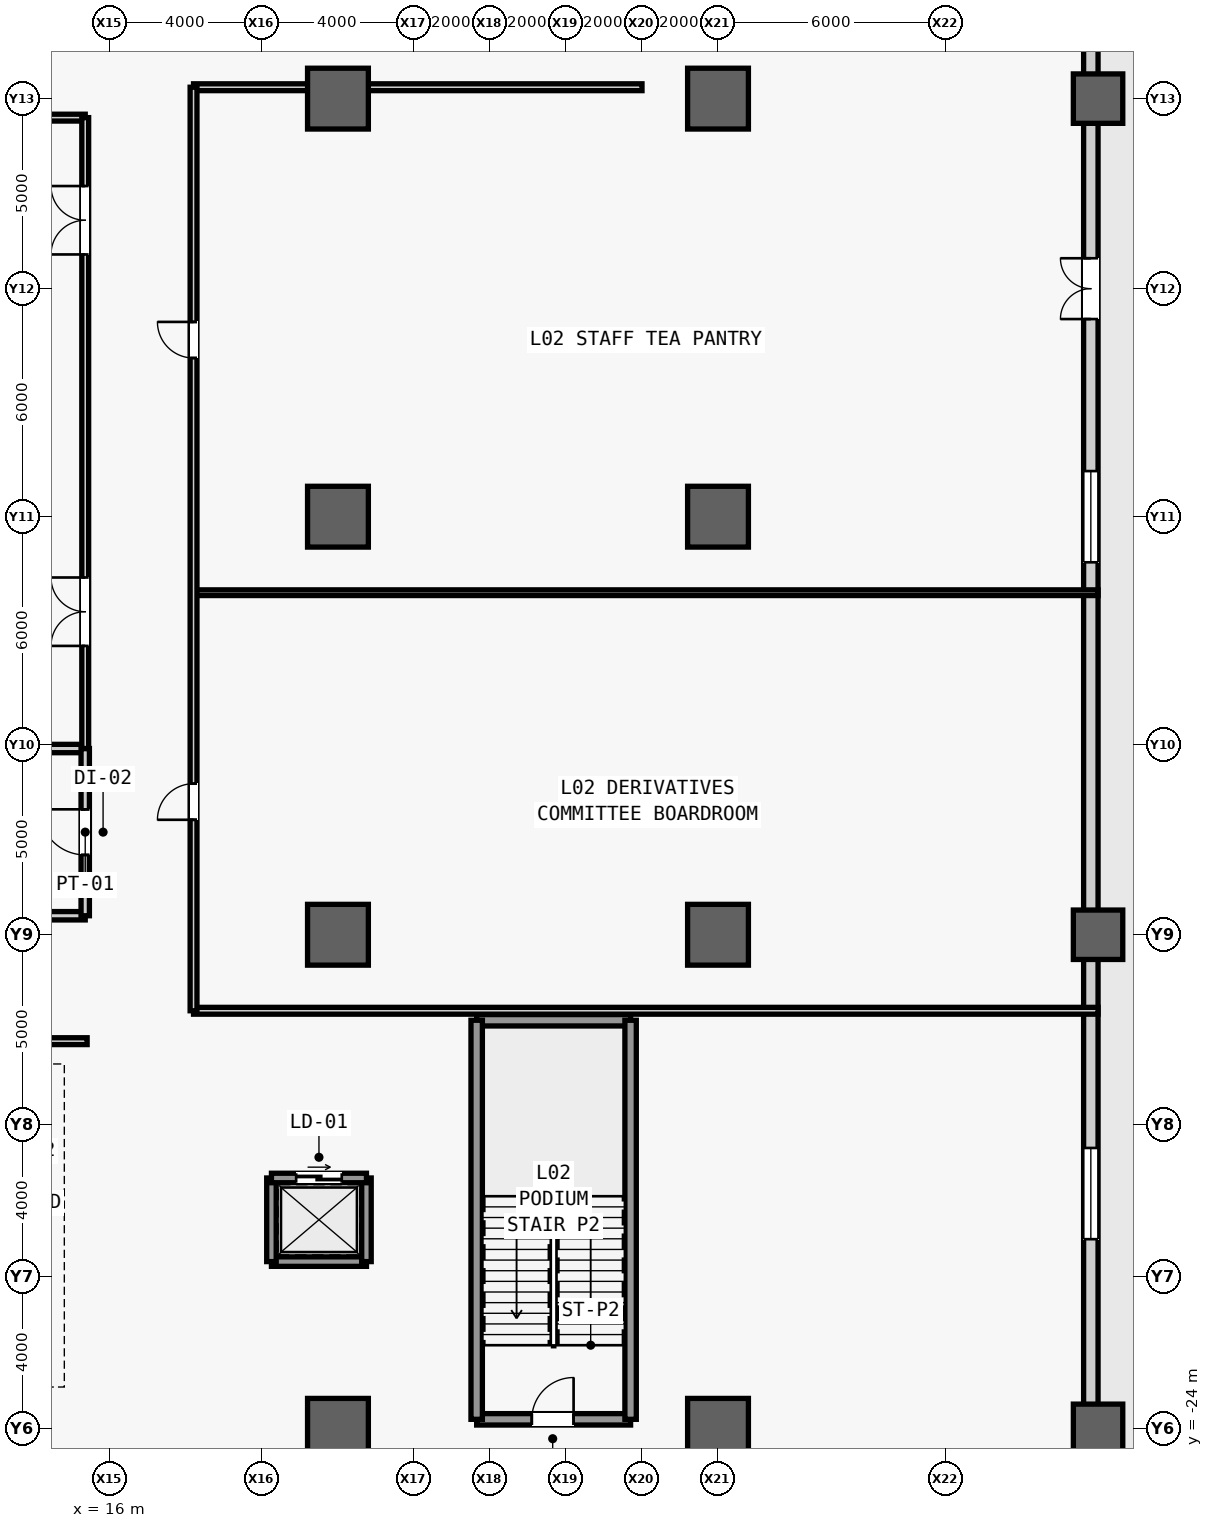
"""IFC4 building model, lengths in metres.
Left out: names, types, materials, properties, quantities, classifications, styles, units other than length and angle.
Written with IfcOpenShell. Run it as: python <this file> out.ifc"""

import sys

from ifc_helpers import new_model, si_unit, direction, frame, frame_2d, origin, origin_2d, place, context, subcontext, project, spatial, rectangle, extrude, source, transform, mapped, element, fill, save


model = new_model("IFC4")
c1 = context("Model", 3, precision=1e-05, world=origin(), true_north=direction((0.0, 1.0)))
c2 = subcontext(c1, "Body", "Model", "MODEL_VIEW")
j1 = project(units=[si_unit("LENGTHUNIT", "METRE"), si_unit("PLANEANGLEUNIT", "RADIAN")], contexts=[c1])
p1 = place(None, origin())
s1 = spatial("IfcSite", under=j1, at=p1, CompositionType="ELEMENT")
p2 = place(p1, origin())
s2 = spatial("IfcBuilding", under=s1, at=p2, CompositionType="ELEMENT")
p3 = place(p2, frame((0.0, 0.0, 12.0)))
s3 = spatial("IfcBuildingStorey", under=s2, at=p3, CompositionType="ELEMENT", Elevation=12.0)
m1 = source(origin(), c2, "Body", "SweptSolid", [
    extrude(rectangle(XDim=1.6, YDim=1.6, at=origin_2d()), origin(), (0.0, 0.0, 1.0), 5.4),
])
for number, where, z_axis, x_axis in (
    (1, (22.0, -24.0, 0.0), (0.0, 0.0, 1.0), (1.0, 0.0, 0.0)),
    (2, (22.0, -11.0, 0.0), (0.0, 0.0, 1.0), (1.0, 0.0, 0.0)),
    (3, (22.0, 0.0, 0.0), (0.0, 0.0, 1.0), (1.0, 0.0, 0.0)),
    (4, (22.0, 11.0, 0.0), (0.0, 0.0, 1.0), (1.0, 0.0, 0.0)),
    (5, (32.0, -24.0, 0.0), (0.0, 0.0, 1.0), (1.0, 0.0, 0.0)),
    (6, (32.0, -11.0, 0.0), (0.0, 0.0, 1.0), (1.0, 0.0, 0.0)),
    (7, (32.0, 0.0, 0.0), (0.0, 0.0, 1.0), (1.0, 0.0, 0.0)),
    (8, (32.0, 11.0, 0.0), (0.0, 0.0, 1.0), (1.0, 0.0, 0.0)),
):
    element("IfcColumn", number, at=place(p3, frame(where, z_axis=z_axis, x_axis=x_axis)), inside=s3, PredefinedType="COLUMN", context=c2, shape_type="MappedRepresentation", body=[
        mapped(m1, transform((0.0, 0.0, 0.0), scale=1.0)),
    ])
m2 = source(origin(), c2, "Body", "SweptSolid", [
    extrude(rectangle(XDim=1.3, YDim=1.3, at=origin_2d()), origin(), (0.0, 0.0, 1.0), 5.4),
])
for number, where, z_axis, x_axis in (
    (9, (42.0, -24.0, 0.0), (0.0, 0.0, 1.0), (1.0, 0.0, 0.0)),
    (10, (42.0, -11.0, 0.0), (0.0, 0.0, 1.0), (1.0, 0.0, 0.0)),
    (11, (42.0, 11.0, 0.0), (0.0, 0.0, 1.0), (1.0, 0.0, 0.0)),
):
    element("IfcColumn", number, at=place(p3, frame(where, z_axis=z_axis, x_axis=x_axis)), inside=s3, PredefinedType="COLUMN", context=c2, shape_type="MappedRepresentation", body=[
        mapped(m2, transform((0.0, 0.0, 0.0), scale=1.0)),
    ])
m3 = source(origin(), c2, "Body", "SweptSolid", [
    extrude(rectangle(XDim=71.24, YDim=0.38, at=frame_2d((35.62, 0.0))), origin(), (0.0, 0.0, 1.0), 3.28),
])
p4 = place(p3, frame((41.81, -35.62, 0.0), z_axis=(0.0, 0.0, 1.0), x_axis=(0.0, 1.0, 0.0)))
e12 = element("IfcWall", 12, at=p4, inside=s3, PredefinedType="STANDARD", context=c2, shape_type="MappedRepresentation", body=[
    mapped(m3, transform((0.0, 0.0, 0.0), scale=1.0)),
])
m4 = source(origin(), c2, "Body", "SweptSolid", [
    extrude(rectangle(XDim=1.6, YDim=2.25, at=frame_2d((0.8, 1.125))), frame((0.0, 0.2, 0.0), z_axis=(0.0, -1.0, 0.0), x_axis=(1.0, 0.0, 0.0)), (0.0, 0.0, 1.0), 0.4),
])
p5 = place(p4, frame((40.82, 0.0, 0.0)))
e13 = element("IfcOpeningElement", 13, at=p5, cuts=e12, PredefinedType="OPENING", context=c2, shape_type="MappedRepresentation", body=[
    mapped(m4, transform((0.0, 0.0, 0.0), scale=1.0)),
])
m5 = source(origin(), c2, "Body", "SweptSolid", [
    extrude(rectangle(XDim=2.4, YDim=2.56, at=frame_2d((1.2, 1.28))), frame((0.0, 0.2, 0.0), z_axis=(0.0, -1.0, 0.0), x_axis=(1.0, 0.0, 0.0)), (0.0, 0.0, 1.0), 0.4),
])
p6 = place(p4, frame((16.61, 0.0, 0.5)))
e14 = element("IfcOpeningElement", 14, at=p6, cuts=e12, PredefinedType="OPENING", context=c2, shape_type="MappedRepresentation", body=[
    mapped(m5, transform((0.0, 0.0, 0.0), scale=1.0)),
])
p7 = place(p4, frame((34.42, 0.0, 0.5)))
e15 = element("IfcOpeningElement", 15, at=p7, cuts=e12, PredefinedType="OPENING", context=c2, shape_type="MappedRepresentation", body=[
    mapped(m5, transform((0.0, 0.0, 0.0), scale=1.0)),
])
p8 = place(p4, frame((52.23, 0.0, 0.5)))
e16 = element("IfcOpeningElement", 16, at=p8, cuts=e12, PredefinedType="OPENING", context=c2, shape_type="MappedRepresentation", body=[
    mapped(m5, transform((0.0, 0.0, 0.0), scale=1.0)),
])
m6 = source(origin(), c2, "Body", "SweptSolid", [
    extrude(rectangle(XDim=4.05, YDim=0.22, at=frame_2d((2.025, 0.0))), origin(), (0.0, 0.0, 1.0), 5.08),
])
for number, where, z_axis, x_axis in (
    (17, (11.3, -10.5, 0.0), (0.0, 0.0, 1.0), (1.0, 0.0, 0.0)),
    (18, (11.3, -6.1, 0.0), (0.0, 0.0, 1.0), (1.0, 0.0, 0.0)),
):
    element("IfcWall", number, at=place(p3, frame(where, z_axis=z_axis, x_axis=x_axis)), inside=s3, PredefinedType="PARTITIONING", context=c2, shape_type="MappedRepresentation", body=[
        mapped(m6, transform((0.0, 0.0, 0.0), scale=1.0)),
    ])
m7 = source(origin(), c2, "Body", "SweptSolid", [
    extrude(rectangle(XDim=4.4, YDim=0.22, at=frame_2d((2.2, 0.0))), origin(), (0.0, 0.0, 1.0), 5.08),
])
p9 = place(p3, frame((15.35, -10.5, 0.0), z_axis=(0.0, 0.0, 1.0), x_axis=(0.0, 1.0, 0.0)))
e19 = element("IfcWall", 19, at=p9, inside=s3, PredefinedType="PARTITIONING", context=c2, shape_type="MappedRepresentation", body=[
    mapped(m7, transform((0.0, 0.0, 0.0), scale=1.0)),
])
m8 = source(origin(), c2, "Body", "SweptSolid", [
    extrude(rectangle(XDim=1.2, YDim=2.2, at=frame_2d((0.6, 1.1))), frame((0.0, 0.12, 0.0), z_axis=(0.0, -1.0, 0.0), x_axis=(1.0, 0.0, 0.0)), (0.0, 0.0, 1.0), 0.24),
])
p10 = place(p9, frame((1.6, 0.0, 0.0)))
e20 = element("IfcOpeningElement", 20, at=p10, cuts=e19, PredefinedType="OPENING", context=c2, shape_type="MappedRepresentation", body=[
    mapped(m8, transform((0.0, 0.0, 0.0), scale=1.0)),
])
m9 = source(origin(), c2, "Body", "SweptSolid", [
    extrude(rectangle(XDim=4.05, YDim=0.18, at=frame_2d((2.025, 0.0))), origin(), (0.0, 0.0, 1.0), 5.08),
])
p11 = place(p3, frame((11.3, 10.5, 0.0), z_axis=(0.0, 0.0, 1.0), x_axis=(1.0, 0.0, 0.0)))
e21 = element("IfcWall", 21, at=p11, inside=s3, PredefinedType="PARTITIONING", context=c2, shape_type="MappedRepresentation", body=[
    mapped(m9, transform((0.0, 0.0, 0.0), scale=1.0)),
])
m10 = source(origin(), c2, "Body", "SweptSolid", [
    extrude(rectangle(XDim=16.6, YDim=0.18, at=frame_2d((8.3, 0.0))), origin(), (0.0, 0.0, 1.0), 5.08),
])
p12 = place(p3, frame((15.35, -6.1, 0.0), z_axis=(0.0, 0.0, 1.0), x_axis=(0.0, 1.0, 0.0)))
e22 = element("IfcWall", 22, at=p12, inside=s3, PredefinedType="PARTITIONING", context=c2, shape_type="MappedRepresentation", body=[
    mapped(m10, transform((0.0, 0.0, 0.0), scale=1.0)),
])
m11 = source(origin(), c2, "Body", "SweptSolid", [
    extrude(rectangle(XDim=1.8, YDim=2.25, at=frame_2d((0.9, 1.125))), frame((0.0, 0.1, 0.0), z_axis=(0.0, -1.0, 0.0), x_axis=(1.0, 0.0, 0.0)), (0.0, 0.0, 1.0), 0.2),
])
p13 = place(p12, frame((2.7, 0.0, 0.0)))
e23 = element("IfcOpeningElement", 23, at=p13, cuts=e22, PredefinedType="OPENING", context=c2, shape_type="MappedRepresentation", body=[
    mapped(m11, transform((0.0, 0.0, 0.0), scale=1.0)),
])
p14 = place(p12, frame((13.0, 0.0, 0.0)))
e24 = element("IfcOpeningElement", 24, at=p14, cuts=e22, PredefinedType="OPENING", context=c2, shape_type="MappedRepresentation", body=[
    mapped(m11, transform((0.0, 0.0, 0.0), scale=1.0)),
])
m12 = source(origin(), c2, "Body", "SweptSolid", [
    extrude(rectangle(XDim=4.05, YDim=0.3, at=frame_2d((2.025, 0.0))), origin(), (0.0, 0.0, 1.0), 5.08),
])
p15 = place(p3, frame((25.65, -23.75, 0.0), z_axis=(0.0, 0.0, 1.0), x_axis=(1.0, 0.0, 0.0)))
e25 = element("IfcWall", 25, at=p15, inside=s3, PredefinedType="SHEAR", context=c2, shape_type="MappedRepresentation", body=[
    mapped(m12, transform((0.0, 0.0, 0.0), scale=1.0)),
])
m13 = source(origin(), c2, "Body", "SweptSolid", [
    extrude(rectangle(XDim=1.1, YDim=2.2, at=frame_2d((0.55, 1.1))), frame((0.0, 0.16, 0.0), z_axis=(0.0, -1.0, 0.0), x_axis=(1.0, 0.0, 0.0)), (0.0, 0.0, 1.0), 0.32),
])
p16 = place(p15, frame((1.45, 0.0, 0.0)))
e26 = element("IfcOpeningElement", 26, at=p16, cuts=e25, PredefinedType="OPENING", context=c2, shape_type="MappedRepresentation", body=[
    mapped(m13, transform((0.0, 0.0, 0.0), scale=1.0)),
])
p17 = place(p3, frame((25.65, -13.25, 0.0), z_axis=(0.0, 0.0, 1.0), x_axis=(1.0, 0.0, 0.0)))
e27 = element("IfcWall", 27, at=p17, inside=s3, PredefinedType="SHEAR", context=c2, shape_type="MappedRepresentation", body=[
    mapped(m12, transform((0.0, 0.0, 0.0), scale=1.0)),
])
m14 = source(origin(), c2, "Body", "SweptSolid", [
    extrude(rectangle(XDim=10.5, YDim=0.3, at=frame_2d((5.25, 0.0))), origin(), (0.0, 0.0, 1.0), 5.08),
])
for number, where, z_axis, x_axis in (
    (28, (25.65, -23.75, 0.0), (0.0, 0.0, 1.0), (0.0, 1.0, 0.0)),
    (29, (29.7, -23.75, 0.0), (0.0, 0.0, 1.0), (0.0, 1.0, 0.0)),
):
    element("IfcWall", number, at=place(p3, frame(where, z_axis=z_axis, x_axis=x_axis)), inside=s3, PredefinedType="SHEAR", context=c2, shape_type="MappedRepresentation", body=[
        mapped(m14, transform((0.0, 0.0, 0.0), scale=1.0)),
    ])
m15 = source(origin(), c2, "Body", "SweptSolid", [
    extrude(rectangle(XDim=2.5, YDim=0.25, at=frame_2d((1.25, 0.0))), origin(), (0.0, 0.0, 1.0), 5.08),
])
p18 = place(p3, frame((20.25, -19.6, 0.0), z_axis=(0.0, 0.0, 1.0), x_axis=(1.0, 0.0, 0.0)))
e30 = element("IfcWall", 30, at=p18, inside=s3, PredefinedType="SHEAR", context=c2, shape_type="MappedRepresentation", body=[
    mapped(m15, transform((0.0, 0.0, 0.0), scale=1.0)),
])
m16 = source(origin(), c2, "Body", "SweptSolid", [
    extrude(rectangle(XDim=2.2, YDim=0.25, at=frame_2d((1.1, 0.0))), origin(), (0.0, 0.0, 1.0), 5.08),
])
for number, where, z_axis, x_axis in (
    (31, (20.25, -19.6, 0.0), (0.0, 0.0, 1.0), (0.0, 1.0, 0.0)),
    (32, (22.75, -19.6, 0.0), (0.0, 0.0, 1.0), (0.0, 1.0, 0.0)),
):
    element("IfcWall", number, at=place(p3, frame(where, z_axis=z_axis, x_axis=x_axis)), inside=s3, PredefinedType="SHEAR", context=c2, shape_type="MappedRepresentation", body=[
        mapped(m16, transform((0.0, 0.0, 0.0), scale=1.0)),
    ])
p19 = place(p3, frame((20.25, -17.4, 0.0), z_axis=(0.0, 0.0, 1.0), x_axis=(1.0, 0.0, 0.0)))
e33 = element("IfcWall", 33, at=p19, inside=s3, PredefinedType="SHEAR", context=c2, shape_type="MappedRepresentation", body=[
    mapped(m15, transform((0.0, 0.0, 0.0), scale=1.0)),
])
m17 = source(origin(), c2, "Body", "SweptSolid", [
    extrude(rectangle(XDim=1.2, YDim=2.3, at=frame_2d((0.6, 1.15))), frame((0.0, 0.135, 0.0), z_axis=(0.0, -1.0, 0.0), x_axis=(1.0, 0.0, 0.0)), (0.0, 0.0, 1.0), 0.27),
])
p20 = place(p19, frame((0.65, 0.0, 0.0)))
e34 = element("IfcOpeningElement", 34, at=p20, cuts=e33, PredefinedType="OPENING", context=c2, shape_type="MappedRepresentation", body=[
    mapped(m17, transform((0.0, 0.0, 0.0), scale=1.0)),
])
m18 = source(origin(), c2, "Body", "SweptSolid", [
    extrude(rectangle(XDim=30.8, YDim=0.18, at=frame_2d((15.4, 0.0))), origin(), (0.0, 0.0, 1.0), 5.08),
])
p21 = place(p3, frame((-15.4, -13.8, 0.0), z_axis=(0.0, 0.0, 1.0), x_axis=(1.0, 0.0, 0.0)))
e35 = element("IfcWall", 35, at=p21, inside=s3, PredefinedType="PARTITIONING", context=c2, shape_type="MappedRepresentation", body=[
    mapped(m18, transform((0.0, 0.0, 0.0), scale=1.0)),
])
p22 = place(p21, frame((2.7, 0.0, 0.0)))
e36 = element("IfcOpeningElement", 36, at=p22, cuts=e35, PredefinedType="OPENING", context=c2, shape_type="MappedRepresentation", body=[
    mapped(m11, transform((0.0, 0.0, 0.0), scale=1.0)),
])
p23 = place(p21, frame((26.3, 0.0, 0.0)))
e37 = element("IfcOpeningElement", 37, at=p23, cuts=e35, PredefinedType="OPENING", context=c2, shape_type="MappedRepresentation", body=[
    mapped(m11, transform((0.0, 0.0, 0.0), scale=1.0)),
])
m19 = source(origin(), c2, "Body", "SweptSolid", [
    extrude(rectangle(XDim=11.8, YDim=0.18, at=frame_2d((5.9, 0.0))), origin(), (0.0, 0.0, 1.0), 3.28),
])
p24 = place(p3, frame((18.2, 11.3, 0.0), z_axis=(0.0, 0.0, 1.0), x_axis=(1.0, 0.0, 0.0)))
e38 = element("IfcWall", 38, at=p24, inside=s3, PredefinedType="PARTITIONING", context=c2, shape_type="MappedRepresentation", body=[
    mapped(m19, transform((0.0, 0.0, 0.0), scale=1.0)),
])
m20 = source(origin(), c2, "Body", "SweptSolid", [
    extrude(rectangle(XDim=23.8, YDim=0.18, at=frame_2d((11.9, 0.0))), origin(), (0.0, 0.0, 1.0), 5.08),
])
p25 = place(p3, frame((18.2, -13.0, 0.0), z_axis=(0.0, 0.0, 1.0), x_axis=(1.0, 0.0, 0.0)))
e39 = element("IfcWall", 39, at=p25, inside=s3, PredefinedType="PARTITIONING", context=c2, shape_type="MappedRepresentation", body=[
    mapped(m20, transform((0.0, 0.0, 0.0), scale=1.0)),
])
m21 = source(origin(), c2, "Body", "SweptSolid", [
    extrude(rectangle(XDim=23.8, YDim=0.15, at=frame_2d((11.9, 0.0))), origin(), (0.0, 0.0, 1.0), 5.08),
])
p26 = place(p3, frame((18.2, -2.0, 0.0), z_axis=(0.0, 0.0, 1.0), x_axis=(1.0, 0.0, 0.0)))
e40 = element("IfcWall", 40, at=p26, inside=s3, PredefinedType="PARTITIONING", context=c2, shape_type="MappedRepresentation", body=[
    mapped(m21, transform((0.0, 0.0, 0.0), scale=1.0)),
])
m22 = source(origin(), c2, "Body", "SweptSolid", [
    extrude(rectangle(XDim=24.3, YDim=0.18, at=frame_2d((12.15, 0.0))), origin(), (0.0, 0.0, 1.0), 5.08),
])
p27 = place(p3, frame((18.2, -13.0, 0.0), z_axis=(0.0, 0.0, 1.0), x_axis=(0.0, 1.0, 0.0)))
e41 = element("IfcWall", 41, at=p27, inside=s3, PredefinedType="PARTITIONING", context=c2, shape_type="MappedRepresentation", body=[
    mapped(m22, transform((0.0, 0.0, 0.0), scale=1.0)),
])
m23 = source(origin(), c2, "Body", "SweptSolid", [
    extrude(rectangle(XDim=0.95, YDim=2.15, at=frame_2d((0.475, 1.075))), frame((0.0, 0.1, 0.0), z_axis=(0.0, -1.0, 0.0), x_axis=(1.0, 0.0, 0.0)), (0.0, 0.0, 1.0), 0.2),
])
p28 = place(p27, frame((5.025, 0.0, 0.0)))
e42 = element("IfcOpeningElement", 42, at=p28, cuts=e41, PredefinedType="OPENING", context=c2, shape_type="MappedRepresentation", body=[
    mapped(m23, transform((0.0, 0.0, 0.0), scale=1.0)),
])
p29 = place(p27, frame((17.175, 0.0, 0.0)))
e43 = element("IfcOpeningElement", 43, at=p29, cuts=e41, PredefinedType="OPENING", context=c2, shape_type="MappedRepresentation", body=[
    mapped(m23, transform((0.0, 0.0, 0.0), scale=1.0)),
])
m24 = source(origin(), c2, "Body", "SweptSolid", [
    extrude(rectangle(XDim=1.6, YDim=2.25, at=frame_2d((0.8, 1.125))), frame((0.0, 0.025, 0.0), z_axis=(0.0, -1.0, 0.0), x_axis=(1.0, 0.0, 0.0)), (0.0, 0.0, 1.0), 0.05),
])
p30 = place(p5, origin())
e44 = element("IfcDoor", 44, at=p30, inside=s3, OperationType="DOUBLE_DOOR_SINGLE_SWING", PredefinedType="DOOR", context=c2, shape_type="MappedRepresentation", body=[
    mapped(m24, transform((0.0, 0.0, 0.0), scale=1.0)),
])
fill(e13, e44)
m25 = source(origin(), c2, "Body", "SweptSolid", [
    extrude(rectangle(XDim=2.4, YDim=2.56, at=frame_2d((1.2, 1.28))), frame((0.0, 0.03, 0.0), z_axis=(0.0, -1.0, 0.0), x_axis=(1.0, 0.0, 0.0)), (0.0, 0.0, 1.0), 0.06),
])
p31 = place(p6, origin())
e45 = element("IfcWindow", 45, at=p31, inside=s3, PartitioningType="SINGLE_PANEL", PredefinedType="WINDOW", context=c2, shape_type="MappedRepresentation", body=[
    mapped(m25, transform((0.0, 0.0, 0.0), scale=1.0)),
])
fill(e14, e45)
p32 = place(p7, origin())
e46 = element("IfcWindow", 46, at=p32, inside=s3, PartitioningType="SINGLE_PANEL", PredefinedType="WINDOW", context=c2, shape_type="MappedRepresentation", body=[
    mapped(m25, transform((0.0, 0.0, 0.0), scale=1.0)),
])
fill(e15, e46)
m26 = source(origin(), c2, "Body", "SweptSolid", [
    extrude(rectangle(XDim=1.2, YDim=2.2, at=frame_2d((0.6, 1.1))), frame((0.0, 0.025, 0.0), z_axis=(0.0, -1.0, 0.0), x_axis=(1.0, 0.0, 0.0)), (0.0, 0.0, 1.0), 0.05),
])
p33 = place(p10, origin())
e47 = element("IfcDoor", 47, at=p33, inside=s3, OperationType="SINGLE_SWING_RIGHT", PredefinedType="DOOR", context=c2, shape_type="MappedRepresentation", body=[
    mapped(m26, transform((0.0, 0.0, 0.0), scale=1.0)),
])
fill(e20, e47)
m27 = source(origin(), c2, "Body", "SweptSolid", [
    extrude(rectangle(XDim=1.8, YDim=2.25, at=frame_2d((0.9, 1.125))), frame((0.0, 0.025, 0.0), z_axis=(0.0, -1.0, 0.0), x_axis=(1.0, 0.0, 0.0)), (0.0, 0.0, 1.0), 0.05),
])
p34 = place(p13, origin())
e48 = element("IfcDoor", 48, at=p34, inside=s3, OperationType="SINGLE_SWING_RIGHT", PredefinedType="DOOR", context=c2, shape_type="MappedRepresentation", body=[
    mapped(m27, transform((0.0, 0.0, 0.0), scale=1.0)),
])
fill(e23, e48)
p35 = place(p14, origin())
e49 = element("IfcDoor", 49, at=p35, inside=s3, OperationType="SINGLE_SWING_LEFT", PredefinedType="DOOR", context=c2, shape_type="MappedRepresentation", body=[
    mapped(m27, transform((0.0, 0.0, 0.0), scale=1.0)),
])
fill(e24, e49)
m28 = source(origin(), c2, "Body", "SweptSolid", [
    extrude(rectangle(XDim=1.1, YDim=2.2, at=frame_2d((0.55, 1.1))), frame((0.0, 0.025, 0.0), z_axis=(0.0, -1.0, 0.0), x_axis=(1.0, 0.0, 0.0)), (0.0, 0.0, 1.0), 0.05),
])
p36 = place(p16, origin())
e50 = element("IfcDoor", 50, at=p36, inside=s3, OperationType="SINGLE_SWING_RIGHT", PredefinedType="DOOR", context=c2, shape_type="MappedRepresentation", body=[
    mapped(m28, transform((0.0, 0.0, 0.0), scale=1.0)),
])
fill(e26, e50)
m29 = source(origin(), c2, "Body", "SweptSolid", [
    extrude(rectangle(XDim=0.95, YDim=2.15, at=frame_2d((0.475, 1.075))), frame((0.0, 0.025, 0.0), z_axis=(0.0, -1.0, 0.0), x_axis=(1.0, 0.0, 0.0)), (0.0, 0.0, 1.0), 0.05),
])
p37 = place(p28, origin())
e51 = element("IfcDoor", 51, at=p37, inside=s3, OperationType="SINGLE_SWING_LEFT", PredefinedType="DOOR", context=c2, shape_type="MappedRepresentation", body=[
    mapped(m29, transform((0.0, 0.0, 0.0), scale=1.0)),
])
fill(e42, e51)
p38 = place(p29, origin())
e52 = element("IfcDoor", 52, at=p38, inside=s3, OperationType="SINGLE_SWING_RIGHT", PredefinedType="DOOR", context=c2, shape_type="MappedRepresentation", body=[
    mapped(m29, transform((0.0, 0.0, 0.0), scale=1.0)),
])
fill(e43, e52)
m30 = source(origin(), c2, "Body", "SweptSolid", [
    extrude(rectangle(XDim=1.2, YDim=2.3, at=frame_2d((0.6, 1.15))), frame((0.0, 0.025, 0.0), z_axis=(0.0, -1.0, 0.0), x_axis=(1.0, 0.0, 0.0)), (0.0, 0.0, 1.0), 0.05),
])
p39 = place(p20, origin())
e53 = element("IfcDoor", 53, at=p39, inside=s3, OperationType="SLIDING_TO_LEFT", PredefinedType="DOOR", context=c2, shape_type="MappedRepresentation", body=[
    mapped(m30, transform((0.0, 0.0, 0.0), scale=1.0)),
])
fill(e34, e53)
save(model, sys.argv[1])
